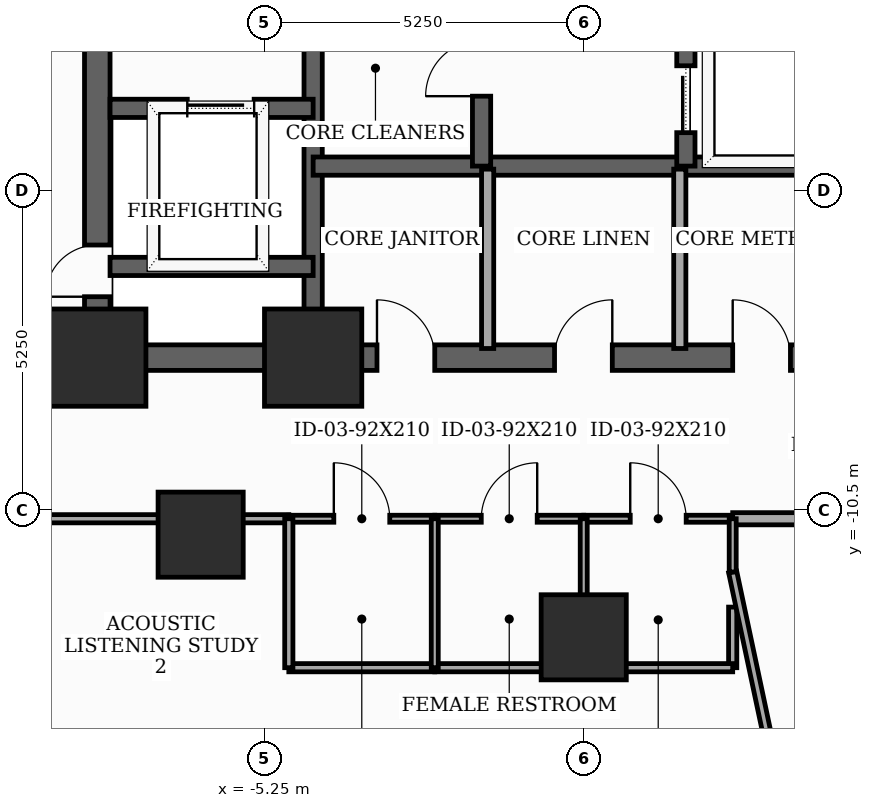
"""IFC4 building model, lengths in metres.
Left out: names, types, materials, properties, quantities, classifications, styles, units other than length and angle.
Written with IfcOpenShell. Run it as: python <this file> out.ifc"""

import sys

from ifc_helpers import new_model, si_unit, direction, frame, frame_2d, origin, origin_2d, place, context, subcontext, project, spatial, rectangle, extrude, element, fill, save


model = new_model("IFC4")
c1 = context("Model", 3, precision=1e-05, world=origin(), true_north=direction((0.0, 1.0)))
c2 = subcontext(c1, "Body", "Model", "MODEL_VIEW")
j1 = project(units=[si_unit("LENGTHUNIT", "METRE"), si_unit("PLANEANGLEUNIT", "RADIAN")], contexts=[c1])
p1 = place(None, origin())
s1 = spatial("IfcSite", under=j1, at=p1, CompositionType="ELEMENT")
p2 = place(p1, origin())
s2 = spatial("IfcBuilding", under=s1, at=p2, CompositionType="ELEMENT")
p3 = place(p2, frame((0.0, 0.0, 74.1)))
s3 = spatial("IfcBuildingStorey", under=s2, at=p3, CompositionType="ELEMENT", Elevation=74.1)
for number, where, z_axis, x_axis in (
    (1, (-8.0, -8.0, 0.0), (0.0, 0.0, 1.0), (1.0, 0.0, 0.0)),
    (2, (-4.45, -8.0, 0.0), (0.0, 0.0, 1.0), (1.0, 0.0, 0.0)),
):
    element("IfcColumn", number, at=place(p3, frame(where, z_axis=z_axis, x_axis=x_axis)), inside=s3, PredefinedType="COLUMN", context=c2, shape_type="SweptSolid", body=[
        extrude(rectangle(XDim=1.6, YDim=1.6, at=origin_2d()), origin(), (0.0, 0.0, 1.0), 3.7),
    ])
for number, where, z_axis, x_axis in (
    (3, (-6.3, -10.912, 0.0), (0.0, 0.0, 1.0), (1.0, 0.0, 0.0)),
    (4, (0.0, -12.6, 0.0), (0.0, 0.0, 1.0), (1.0, 0.0, 0.0)),
):
    element("IfcColumn", number, at=place(p3, frame(where, z_axis=z_axis, x_axis=x_axis)), inside=s3, PredefinedType="COLUMN", context=c2, shape_type="SweptSolid", body=[
        extrude(rectangle(XDim=1.4, YDim=1.4, at=origin_2d()), origin(), (0.0, 0.0, 1.0), 3.7),
    ])
p4 = place(p3, frame((-8.0, -8.0, 0.0), z_axis=(0.0, 0.0, 1.0), x_axis=(0.0, 1.0, 0.0)))
e5 = element("IfcWall", 5, at=p4, inside=s3, PredefinedType="SHEAR", context=c2, shape_type="SweptSolid", body=[
    extrude(rectangle(XDim=16.0, YDim=0.42, at=frame_2d((8.0, 0.0))), origin(), (0.0, 0.0, 1.0), 3.5),
])
p5 = place(p4, frame((1.002, 0.0, 0.0)))
e6 = element("IfcOpeningElement", 6, at=p5, cuts=e5, PredefinedType="OPENING", context=c2, shape_type="SweptSolid", body=[
    extrude(rectangle(XDim=0.85, YDim=2.02, at=frame_2d((0.425, 1.01))), frame((0.0, 0.22, 0.0), z_axis=(0.0, -1.0, 0.0), x_axis=(1.0, 0.0, 0.0)), (0.0, 0.0, 1.0), 0.44),
])
p6 = place(p4, frame((5.35, 0.0, 0.0)))
e7 = element("IfcOpeningElement", 7, at=p6, cuts=e5, PredefinedType="OPENING", context=c2, shape_type="SweptSolid", body=[
    extrude(rectangle(XDim=1.05, YDim=2.15, at=frame_2d((0.525, 1.075))), frame((0.0, 0.22, 0.0), z_axis=(0.0, -1.0, 0.0), x_axis=(1.0, 0.0, 0.0)), (0.0, 0.0, 1.0), 0.44),
])
p7 = place(p3, frame((-8.0, -8.0, 0.0), z_axis=(0.0, 0.0, 1.0), x_axis=(1.0, 0.0, 0.0)))
e8 = element("IfcWall", 8, at=p7, inside=s3, PredefinedType="SHEAR", context=c2, shape_type="SweptSolid", body=[
    extrude(rectangle(XDim=16.0, YDim=0.42, at=frame_2d((8.0, 0.0))), origin(), (0.0, 0.0, 1.0), 3.5),
])
p8 = place(p7, frame((4.6, 0.0, 0.0)))
e9 = element("IfcOpeningElement", 9, at=p8, cuts=e8, PredefinedType="OPENING", context=c2, shape_type="SweptSolid", body=[
    extrude(rectangle(XDim=0.95, YDim=2.1, at=frame_2d((0.475, 1.05))), frame((0.0, 0.22, 0.0), z_axis=(0.0, -1.0, 0.0), x_axis=(1.0, 0.0, 0.0)), (0.0, 0.0, 1.0), 0.44),
])
p9 = place(p7, frame((7.52, 0.0, 0.0)))
e10 = element("IfcOpeningElement", 10, at=p9, cuts=e8, PredefinedType="OPENING", context=c2, shape_type="SweptSolid", body=[
    extrude(rectangle(XDim=0.95, YDim=2.1, at=frame_2d((0.475, 1.05))), frame((0.0, 0.22, 0.0), z_axis=(0.0, -1.0, 0.0), x_axis=(1.0, 0.0, 0.0)), (0.0, 0.0, 1.0), 0.44),
])
p10 = place(p7, frame((10.45, 0.0, 0.0)))
e11 = element("IfcOpeningElement", 11, at=p10, cuts=e8, PredefinedType="OPENING", context=c2, shape_type="SweptSolid", body=[
    extrude(rectangle(XDim=0.95, YDim=2.1, at=frame_2d((0.475, 1.05))), frame((0.0, 0.22, 0.0), z_axis=(0.0, -1.0, 0.0), x_axis=(1.0, 0.0, 0.0)), (0.0, 0.0, 1.0), 0.44),
])
p11 = place(p3, frame((-4.45, -7.79, 0.0), z_axis=(0.0, 0.0, 1.0), x_axis=(0.0, 1.0, 0.0)))
e12 = element("IfcWall", 12, at=p11, inside=s3, PredefinedType="SHEAR", context=c2, shape_type="SweptSolid", body=[
    extrude(rectangle(XDim=15.58, YDim=0.3, at=frame_2d((7.79, 0.0))), origin(), (0.0, 0.0, 1.0), 3.5),
])
p12 = place(p3, frame((-7.79, -3.9, 0.0), z_axis=(0.0, 0.0, 1.0), x_axis=(1.0, 0.0, 0.0)))
e13 = element("IfcWall", 13, at=p12, inside=s3, PredefinedType="SHEAR", context=c2, shape_type="SweptSolid", body=[
    extrude(rectangle(XDim=3.34, YDim=0.3, at=frame_2d((1.67, 0.0))), origin(), (0.0, 0.0, 1.0), 3.5),
])
p13 = place(p12, frame((1.27, 0.0, 0.0)))
e14 = element("IfcOpeningElement", 14, at=p13, cuts=e13, PredefinedType="OPENING", context=c2, shape_type="SweptSolid", body=[
    extrude(rectangle(XDim=1.1, YDim=2.1, at=frame_2d((0.55, 1.05))), frame((0.0, 0.16, 0.0), z_axis=(0.0, -1.0, 0.0), x_axis=(1.0, 0.0, 0.0)), (0.0, 0.0, 1.0), 0.32),
])
p14 = place(p3, frame((-7.79, -6.5, 0.0), z_axis=(0.0, 0.0, 1.0), x_axis=(1.0, 0.0, 0.0)))
e15 = element("IfcWall", 15, at=p14, inside=s3, PredefinedType="SHEAR", context=c2, shape_type="SweptSolid", body=[
    extrude(rectangle(XDim=3.34, YDim=0.3, at=frame_2d((1.67, 0.0))), origin(), (0.0, 0.0, 1.0), 3.5),
])
p15 = place(p3, frame((-4.45, -4.85, 0.0), z_axis=(0.0, 0.0, 1.0), x_axis=(1.0, 0.0, 0.0)))
e16 = element("IfcWall", 16, at=p15, inside=s3, PredefinedType="SHEAR", context=c2, shape_type="SweptSolid", body=[
    extrude(rectangle(XDim=8.9, YDim=0.3, at=frame_2d((4.45, 0.0))), origin(), (0.0, 0.0, 1.0), 3.5),
])
p16 = place(p3, frame((-1.68, -4.85, 0.0), z_axis=(0.0, 0.0, 1.0), x_axis=(0.0, 1.0, 0.0)))
e17 = element("IfcWall", 17, at=p16, inside=s3, PredefinedType="SHEAR", context=c2, shape_type="SweptSolid", body=[
    extrude(rectangle(XDim=12.64, YDim=0.3, at=frame_2d((6.32, 0.0))), origin(), (0.0, 0.0, 1.0), 3.5),
])
p17 = place(p16, frame((3.95, 0.0, 0.0)))
e18 = element("IfcOpeningElement", 18, at=p17, cuts=e17, PredefinedType="OPENING", context=c2, shape_type="SweptSolid", body=[
    extrude(rectangle(XDim=1.1, YDim=2.1, at=frame_2d((0.55, 1.05))), frame((0.0, 0.16, 0.0), z_axis=(0.0, -1.0, 0.0), x_axis=(1.0, 0.0, 0.0)), (0.0, 0.0, 1.0), 0.32),
])
p18 = place(p16, frame((6.25, 0.0, 0.0)))
e19 = element("IfcOpeningElement", 19, at=p18, cuts=e17, PredefinedType="OPENING", context=c2, shape_type="SweptSolid", body=[
    extrude(rectangle(XDim=1.1, YDim=2.1, at=frame_2d((0.55, 1.05))), frame((0.0, 0.16, 0.0), z_axis=(0.0, -1.0, 0.0), x_axis=(1.0, 0.0, 0.0)), (0.0, 0.0, 1.0), 0.32),
])
p19 = place(p16, frame((8.55, 0.0, 0.0)))
e20 = element("IfcOpeningElement", 20, at=p19, cuts=e17, PredefinedType="OPENING", context=c2, shape_type="SweptSolid", body=[
    extrude(rectangle(XDim=1.1, YDim=2.1, at=frame_2d((0.55, 1.05))), frame((0.0, 0.16, 0.0), z_axis=(0.0, -1.0, 0.0), x_axis=(1.0, 0.0, 0.0)), (0.0, 0.0, 1.0), 0.32),
])
p20 = place(p16, frame((10.85, 0.0, 0.0)))
e21 = element("IfcOpeningElement", 21, at=p20, cuts=e17, PredefinedType="OPENING", context=c2, shape_type="SweptSolid", body=[
    extrude(rectangle(XDim=1.1, YDim=2.1, at=frame_2d((0.55, 1.05))), frame((0.0, 0.16, 0.0), z_axis=(0.0, -1.0, 0.0), x_axis=(1.0, 0.0, 0.0)), (0.0, 0.0, 1.0), 0.32),
])
p21 = place(p16, frame((1.15, 0.0, 0.0)))
e22 = element("IfcOpeningElement", 22, at=p21, cuts=e17, PredefinedType="OPENING", context=c2, shape_type="SweptSolid", body=[
    extrude(rectangle(XDim=0.92, YDim=2.1, at=frame_2d((0.46, 1.05))), frame((0.0, 0.16, 0.0), z_axis=(0.0, -1.0, 0.0), x_axis=(1.0, 0.0, 0.0)), (0.0, 0.0, 1.0), 0.32),
])
p22 = place(p3, frame((1.68, -4.85, 0.0), z_axis=(0.0, 0.0, 1.0), x_axis=(0.0, 1.0, 0.0)))
e23 = element("IfcWall", 23, at=p22, inside=s3, PredefinedType="SHEAR", context=c2, shape_type="SweptSolid", body=[
    extrude(rectangle(XDim=12.64, YDim=0.3, at=frame_2d((6.32, 0.0))), origin(), (0.0, 0.0, 1.0), 3.5),
])
p23 = place(p22, frame((0.55, 0.0, 0.0)))
e24 = element("IfcOpeningElement", 24, at=p23, cuts=e23, PredefinedType="OPENING", context=c2, shape_type="SweptSolid", body=[
    extrude(rectangle(XDim=1.1, YDim=2.1, at=frame_2d((0.55, 1.05))), frame((0.0, 0.16, 0.0), z_axis=(0.0, -1.0, 0.0), x_axis=(1.0, 0.0, 0.0)), (0.0, 0.0, 1.0), 0.32),
])
p24 = place(p22, frame((2.65, 0.0, 0.0)))
e25 = element("IfcOpeningElement", 25, at=p24, cuts=e23, PredefinedType="OPENING", context=c2, shape_type="SweptSolid", body=[
    extrude(rectangle(XDim=1.1, YDim=2.1, at=frame_2d((0.55, 1.05))), frame((0.0, 0.16, 0.0), z_axis=(0.0, -1.0, 0.0), x_axis=(1.0, 0.0, 0.0)), (0.0, 0.0, 1.0), 0.32),
])
p25 = place(p22, frame((4.75, 0.0, 0.0)))
e26 = element("IfcOpeningElement", 26, at=p25, cuts=e23, PredefinedType="OPENING", context=c2, shape_type="SweptSolid", body=[
    extrude(rectangle(XDim=1.1, YDim=2.1, at=frame_2d((0.55, 1.05))), frame((0.0, 0.16, 0.0), z_axis=(0.0, -1.0, 0.0), x_axis=(1.0, 0.0, 0.0)), (0.0, 0.0, 1.0), 0.32),
])
p26 = place(p22, frame((6.85, 0.0, 0.0)))
e27 = element("IfcOpeningElement", 27, at=p26, cuts=e23, PredefinedType="OPENING", context=c2, shape_type="SweptSolid", body=[
    extrude(rectangle(XDim=1.1, YDim=2.1, at=frame_2d((0.55, 1.05))), frame((0.0, 0.16, 0.0), z_axis=(0.0, -1.0, 0.0), x_axis=(1.0, 0.0, 0.0)), (0.0, 0.0, 1.0), 0.32),
])
p27 = place(p22, frame((8.95, 0.0, 0.0)))
e28 = element("IfcOpeningElement", 28, at=p27, cuts=e23, PredefinedType="OPENING", context=c2, shape_type="SweptSolid", body=[
    extrude(rectangle(XDim=1.1, YDim=2.1, at=frame_2d((0.55, 1.05))), frame((0.0, 0.16, 0.0), z_axis=(0.0, -1.0, 0.0), x_axis=(1.0, 0.0, 0.0)), (0.0, 0.0, 1.0), 0.32),
])
p28 = place(p22, frame((11.05, 0.0, 0.0)))
e29 = element("IfcOpeningElement", 29, at=p28, cuts=e23, PredefinedType="OPENING", context=c2, shape_type="SweptSolid", body=[
    extrude(rectangle(XDim=1.1, YDim=2.1, at=frame_2d((0.55, 1.05))), frame((0.0, 0.16, 0.0), z_axis=(0.0, -1.0, 0.0), x_axis=(1.0, 0.0, 0.0)), (0.0, 0.0, 1.0), 0.32),
])
for number, where, z_axis, x_axis in (
    (30, (-1.58, -7.85, 0.0), (0.0, 0.0, 1.0), (0.0, 1.0, 0.0)),
    (31, (1.58, -7.85, 0.0), (0.0, 0.0, 1.0), (0.0, 1.0, 0.0)),
):
    element("IfcWall", number, at=place(p3, frame(where, z_axis=z_axis, x_axis=x_axis)), inside=s3, PredefinedType="SOLIDWALL", context=c2, shape_type="SweptSolid", body=[
        extrude(rectangle(XDim=2.95, YDim=0.2, at=frame_2d((1.475, 0.0))), origin(), (0.0, 0.0, 1.0), 2.885),
    ])
p29 = place(p3, frame((-10.15, -10.65, 0.0), z_axis=(0.0, 0.0, 1.0), x_axis=(1.0, 0.0, 0.0)))
e32 = element("IfcWall", 32, at=p29, inside=s3, PredefinedType="PARTITIONING", context=c2, shape_type="SweptSolid", body=[
    extrude(rectangle(XDim=5.3, YDim=0.135, at=frame_2d((2.65, 0.0))), origin(), (0.0, 0.0, 1.0), 2.785),
])
p30 = place(p3, frame((-4.85, -10.65, 0.0), z_axis=(0.0, 0.0, 1.0), x_axis=(1.0, 0.0, 0.0)))
e33 = element("IfcWall", 33, at=p30, inside=s3, PredefinedType="PARTITIONING", context=c2, shape_type="SweptSolid", body=[
    extrude(rectangle(XDim=2.4, YDim=0.115, at=frame_2d((1.2, 0.0))), origin(), (0.0, 0.0, 1.0), 3.5),
])
p31 = place(p30, frame((0.74, 0.0, 0.0)))
e34 = element("IfcOpeningElement", 34, at=p31, cuts=e33, PredefinedType="OPENING", context=c2, shape_type="SweptSolid", body=[
    extrude(rectangle(XDim=0.92, YDim=2.1, at=frame_2d((0.46, 1.05))), frame((0.0, 0.067, 0.0), z_axis=(0.0, -1.0, 0.0), x_axis=(1.0, 0.0, 0.0)), (0.0, 0.0, 1.0), 0.135),
])
p32 = place(p3, frame((-2.45, -10.65, 0.0), z_axis=(0.0, 0.0, 1.0), x_axis=(1.0, 0.0, 0.0)))
e35 = element("IfcWall", 35, at=p32, inside=s3, PredefinedType="PARTITIONING", context=c2, shape_type="SweptSolid", body=[
    extrude(rectangle(XDim=2.45, YDim=0.115, at=frame_2d((1.225, 0.0))), origin(), (0.0, 0.0, 1.0), 2.785),
])
p33 = place(p32, frame((0.765, 0.0, 0.0)))
e36 = element("IfcOpeningElement", 36, at=p33, cuts=e35, PredefinedType="OPENING", context=c2, shape_type="SweptSolid", body=[
    extrude(rectangle(XDim=0.92, YDim=2.1, at=frame_2d((0.46, 1.05))), frame((0.0, 0.067, 0.0), z_axis=(0.0, -1.0, 0.0), x_axis=(1.0, 0.0, 0.0)), (0.0, 0.0, 1.0), 0.135),
])
p34 = place(p3, frame((0.0, -10.65, 0.0), z_axis=(0.0, 0.0, 1.0), x_axis=(1.0, 0.0, 0.0)))
e37 = element("IfcWall", 37, at=p34, inside=s3, PredefinedType="PARTITIONING", context=c2, shape_type="SweptSolid", body=[
    extrude(rectangle(XDim=2.45, YDim=0.115, at=frame_2d((1.225, 0.0))), origin(), (0.0, 0.0, 1.0), 3.5),
])
p35 = place(p34, frame((0.765, 0.0, 0.0)))
e38 = element("IfcOpeningElement", 38, at=p35, cuts=e37, PredefinedType="OPENING", context=c2, shape_type="SweptSolid", body=[
    extrude(rectangle(XDim=0.92, YDim=2.1, at=frame_2d((0.46, 1.05))), frame((0.0, 0.067, 0.0), z_axis=(0.0, -1.0, 0.0), x_axis=(1.0, 0.0, 0.0)), (0.0, 0.0, 1.0), 0.135),
])
p36 = place(p3, frame((2.45, -10.65, 0.0), z_axis=(0.0, 0.0, 1.0), x_axis=(1.0, 0.0, 0.0)))
e39 = element("IfcWall", 39, at=p36, inside=s3, PredefinedType="SOLIDWALL", context=c2, shape_type="SweptSolid", body=[
    extrude(rectangle(XDim=7.7, YDim=0.2, at=frame_2d((3.85, 0.0))), origin(), (0.0, 0.0, 1.0), 2.785),
])
p37 = place(p3, frame((-9.328, -14.093, 0.0), z_axis=(0.0, 0.0, 1.0), x_axis=(0.928830986118, -0.370503710139, 0.0)))
e40 = element("IfcWall", 40, at=p37, inside=s3, PredefinedType="PARTITIONING", context=c2, shape_type="SweptSolid", body=[
    extrude(rectangle(XDim=6.883, YDim=0.135, at=frame_2d((3.441, 0.0))), origin(), (0.0, 0.0, 1.0), 2.785),
])
p38 = place(p3, frame((-2.45, -13.1, 0.0), z_axis=(0.0, 0.0, 1.0), x_axis=(-1.0, 0.0, 0.0)))
e41 = element("IfcWall", 41, at=p38, inside=s3, PredefinedType="PARTITIONING", context=c2, shape_type="SweptSolid", body=[
    extrude(rectangle(XDim=2.4, YDim=0.135, at=frame_2d((1.2, 0.0))), origin(), (0.0, 0.0, 1.0), 3.5),
])
p39 = place(p3, frame((-4.85, -13.1, 0.0), z_axis=(0.0, 0.0, 1.0), x_axis=(0.0, 1.0, 0.0)))
e42 = element("IfcWall", 42, at=p39, inside=s3, PredefinedType="PARTITIONING", context=c2, shape_type="SweptSolid", body=[
    extrude(rectangle(XDim=2.45, YDim=0.135, at=frame_2d((1.225, 0.0))), origin(), (0.0, 0.0, 1.0), 2.785),
])
p40 = place(p3, frame((0.0, -13.1, 0.0), z_axis=(0.0, 0.0, 1.0), x_axis=(-1.0, 0.0, 0.0)))
e43 = element("IfcWall", 43, at=p40, inside=s3, PredefinedType="PARTITIONING", context=c2, shape_type="SweptSolid", body=[
    extrude(rectangle(XDim=2.45, YDim=0.135, at=frame_2d((1.225, 0.0))), origin(), (0.0, 0.0, 1.0), 2.785),
])
p41 = place(p3, frame((2.45, -12.103, 0.0), z_axis=(0.0, 0.0, 1.0), x_axis=(0.0, -1.0, 0.0)))
e44 = element("IfcWall", 44, at=p41, inside=s3, PredefinedType="PARTITIONING", context=c2, shape_type="SweptSolid", body=[
    extrude(rectangle(XDim=0.997, YDim=0.135, at=frame_2d((0.499, 0.0))), origin(), (0.0, 0.0, 1.0), 2.785),
])
p42 = place(p3, frame((2.45, -13.1, 0.0), z_axis=(0.0, 0.0, 1.0), x_axis=(-1.0, 0.0, 0.0)))
e45 = element("IfcWall", 45, at=p42, inside=s3, PredefinedType="PARTITIONING", context=c2, shape_type="SweptSolid", body=[
    extrude(rectangle(XDim=2.45, YDim=0.135, at=frame_2d((1.225, 0.0))), origin(), (0.0, 0.0, 1.0), 2.785),
])
p43 = place(p3, frame((3.496, -16.447, 0.0), z_axis=(0.0, 0.0, 1.0), x_axis=(-0.207934783689, 0.978142691908, 0.0)))
e46 = element("IfcWall", 46, at=p43, inside=s3, PredefinedType="PARTITIONING", context=c2, shape_type="SweptSolid", body=[
    extrude(rectangle(XDim=5.031, YDim=0.135, at=frame_2d((2.516, 0.0))), origin(), (0.0, 0.0, 1.0), 2.785),
])
for number, where, z_axis, x_axis in (
    (47, (-2.45, -13.1, 0.0), (0.0, 0.0, 1.0), (0.0, 1.0, 0.0)),
    (48, (0.0, -13.1, 0.0), (0.0, 0.0, 1.0), (0.0, 1.0, 0.0)),
):
    element("IfcWall", number, at=place(p3, frame(where, z_axis=z_axis, x_axis=x_axis)), inside=s3, PredefinedType="PARTITIONING", context=c2, shape_type="SweptSolid", body=[
        extrude(rectangle(XDim=2.45, YDim=0.115, at=frame_2d((1.225, 0.0))), origin(), (0.0, 0.0, 1.0), 2.785),
    ])
p44 = place(p3, frame((2.45, -11.526, 0.0), z_axis=(0.0, 0.0, 1.0), x_axis=(0.0, 1.0, 0.0)))
e49 = element("IfcWall", 49, at=p44, inside=s3, PredefinedType="PARTITIONING", context=c2, shape_type="SweptSolid", body=[
    extrude(rectangle(XDim=0.876, YDim=0.115, at=frame_2d((0.438, 0.0))), origin(), (0.0, 0.0, 1.0), 3.5),
])
p45 = place(p5, origin())
e50 = element("IfcDoor", 50, at=p45, inside=s3, OperationType="SINGLE_SWING_LEFT", PredefinedType="TRAPDOOR", context=c2, shape_type="SweptSolid", body=[
    extrude(rectangle(XDim=0.85, YDim=2.02, at=frame_2d((0.425, 1.01))), frame((0.0, 0.025, 0.0), z_axis=(0.0, -1.0, 0.0), x_axis=(1.0, 0.0, 0.0)), (0.0, 0.0, 1.0), 0.05),
])
fill(e6, e50)
p46 = place(p8, origin())
e51 = element("IfcDoor", 51, at=p46, inside=s3, OperationType="SINGLE_SWING_LEFT", PredefinedType="DOOR", context=c2, shape_type="SweptSolid", body=[
    extrude(rectangle(XDim=0.95, YDim=2.1, at=frame_2d((0.475, 1.05))), frame((0.0, 0.025, 0.0), z_axis=(0.0, -1.0, 0.0), x_axis=(1.0, 0.0, 0.0)), (0.0, 0.0, 1.0), 0.05),
])
fill(e9, e51)
p47 = place(p9, origin())
e52 = element("IfcDoor", 52, at=p47, inside=s3, OperationType="SINGLE_SWING_RIGHT", PredefinedType="DOOR", context=c2, shape_type="SweptSolid", body=[
    extrude(rectangle(XDim=0.95, YDim=2.1, at=frame_2d((0.475, 1.05))), frame((0.0, 0.025, 0.0), z_axis=(0.0, -1.0, 0.0), x_axis=(1.0, 0.0, 0.0)), (0.0, 0.0, 1.0), 0.05),
])
fill(e10, e52)
p48 = place(p10, origin())
e53 = element("IfcDoor", 53, at=p48, inside=s3, OperationType="SINGLE_SWING_LEFT", PredefinedType="DOOR", context=c2, shape_type="SweptSolid", body=[
    extrude(rectangle(XDim=0.95, YDim=2.1, at=frame_2d((0.475, 1.05))), frame((0.0, 0.025, 0.0), z_axis=(0.0, -1.0, 0.0), x_axis=(1.0, 0.0, 0.0)), (0.0, 0.0, 1.0), 0.05),
])
fill(e11, e53)
p49 = place(p13, origin())
e54 = element("IfcDoor", 54, at=p49, inside=s3, OperationType="SLIDING_TO_LEFT", PredefinedType="DOOR", context=c2, shape_type="SweptSolid", body=[
    extrude(rectangle(XDim=1.1, YDim=2.1, at=frame_2d((0.55, 1.05))), frame((0.0, 0.025, 0.0), z_axis=(0.0, -1.0, 0.0), x_axis=(1.0, 0.0, 0.0)), (0.0, 0.0, 1.0), 0.05),
])
fill(e14, e54)
p50 = place(p21, origin())
e55 = element("IfcDoor", 55, at=p50, inside=s3, OperationType="SINGLE_SWING_LEFT", PredefinedType="DOOR", context=c2, shape_type="SweptSolid", body=[
    extrude(rectangle(XDim=0.92, YDim=2.1, at=frame_2d((0.46, 1.05))), frame((0.0, 0.025, 0.0), z_axis=(0.0, -1.0, 0.0), x_axis=(1.0, 0.0, 0.0)), (0.0, 0.0, 1.0), 0.05),
])
fill(e22, e55)
p51 = place(p23, origin())
e56 = element("IfcDoor", 56, at=p51, inside=s3, OperationType="SLIDING_TO_LEFT", PredefinedType="DOOR", context=c2, shape_type="SweptSolid", body=[
    extrude(rectangle(XDim=1.1, YDim=2.1, at=frame_2d((0.55, 1.05))), frame((0.0, 0.025, 0.0), z_axis=(0.0, -1.0, 0.0), x_axis=(1.0, 0.0, 0.0)), (0.0, 0.0, 1.0), 0.05),
])
fill(e24, e56)
p52 = place(p31, origin())
e57 = element("IfcDoor", 57, at=p52, inside=s3, OperationType="SINGLE_SWING_LEFT", PredefinedType="DOOR", context=c2, shape_type="SweptSolid", body=[
    extrude(rectangle(XDim=0.92, YDim=2.1, at=frame_2d((0.46, 1.05))), frame((0.0, 0.025, 0.0), z_axis=(0.0, -1.0, 0.0), x_axis=(1.0, 0.0, 0.0)), (0.0, 0.0, 1.0), 0.05),
])
fill(e34, e57)
p53 = place(p33, origin())
e58 = element("IfcDoor", 58, at=p53, inside=s3, OperationType="SINGLE_SWING_RIGHT", PredefinedType="DOOR", context=c2, shape_type="SweptSolid", body=[
    extrude(rectangle(XDim=0.92, YDim=2.1, at=frame_2d((0.46, 1.05))), frame((0.0, 0.025, 0.0), z_axis=(0.0, -1.0, 0.0), x_axis=(1.0, 0.0, 0.0)), (0.0, 0.0, 1.0), 0.05),
])
fill(e36, e58)
p54 = place(p35, origin())
e59 = element("IfcDoor", 59, at=p54, inside=s3, OperationType="SINGLE_SWING_LEFT", PredefinedType="DOOR", context=c2, shape_type="SweptSolid", body=[
    extrude(rectangle(XDim=0.92, YDim=2.1, at=frame_2d((0.46, 1.05))), frame((0.0, 0.025, 0.0), z_axis=(0.0, -1.0, 0.0), x_axis=(1.0, 0.0, 0.0)), (0.0, 0.0, 1.0), 0.05),
])
fill(e38, e59)
save(model, sys.argv[1])
